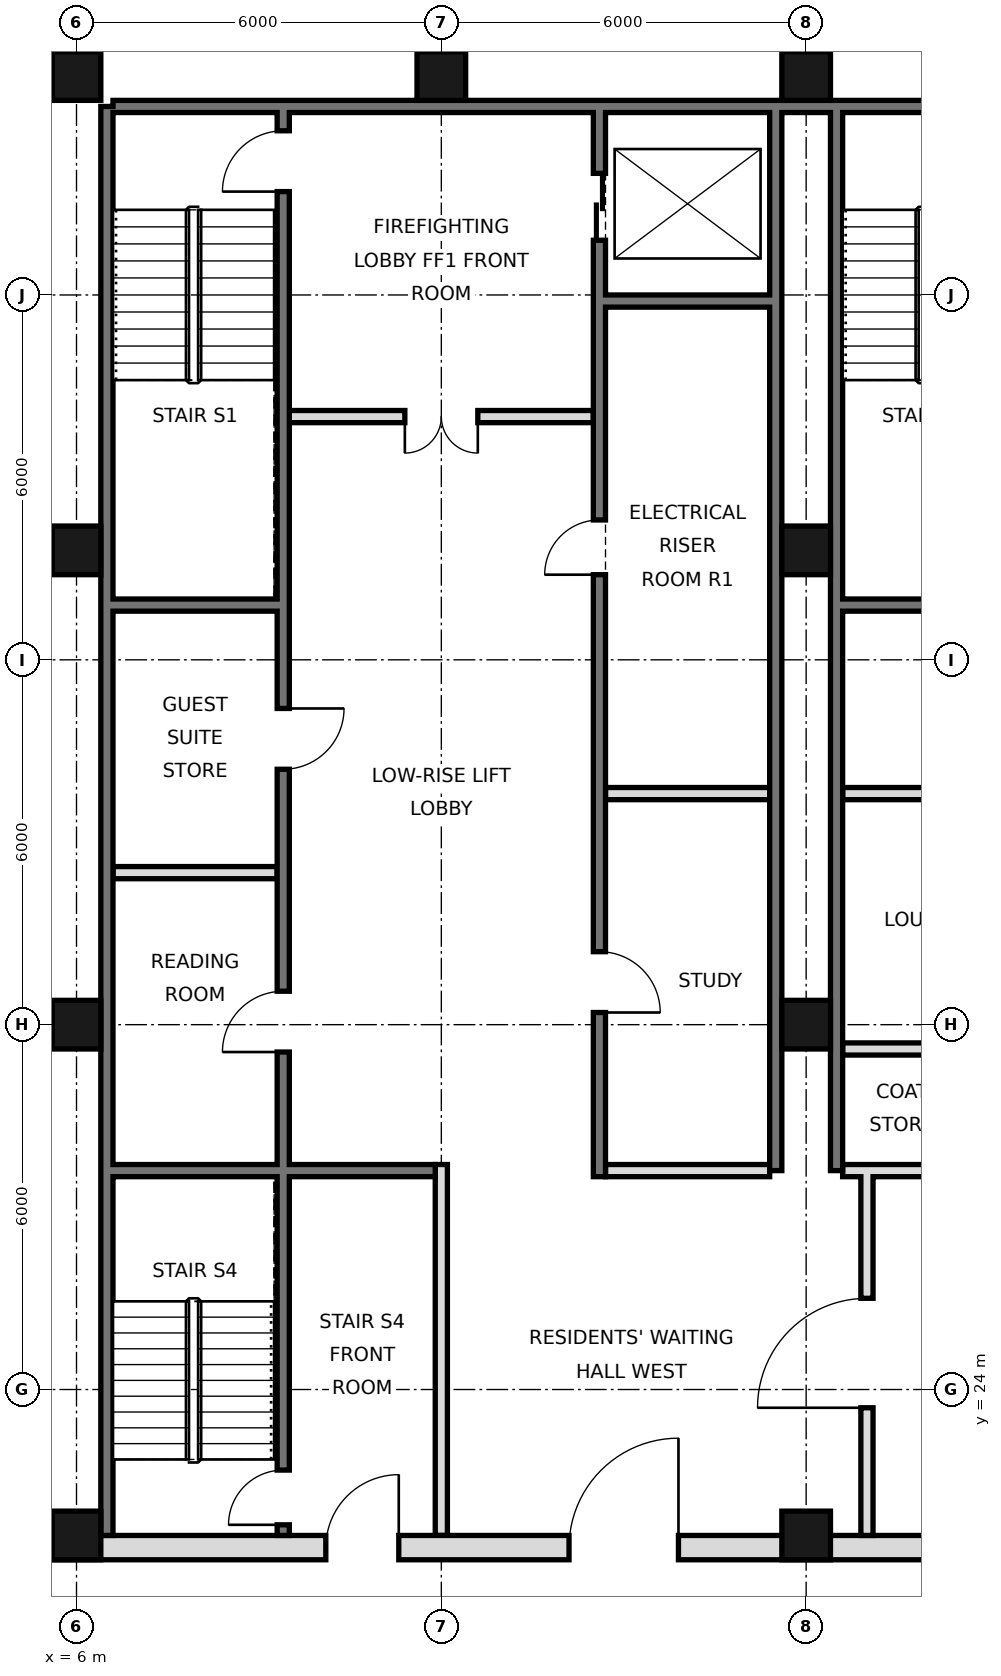
"""IFC4 building model, lengths in metres.
Left out: names, types, materials, properties, quantities, classifications, styles, units other than length and angle.
Written with IfcOpenShell. Run it as: python <this file> out.ifc"""

import sys

from ifc_helpers import new_model, si_unit, direction, frame, frame_2d, origin, origin_2d, place, context, subcontext, project, spatial, rectangle, hollow_rectangle, extrude, element, fill, save


model = new_model("IFC4")
c1 = context("Model", 3, precision=1e-05, world=origin(), true_north=direction((0.0, 1.0)))
c2 = subcontext(c1, "Body", "Model", "MODEL_VIEW")
j1 = project(units=[si_unit("LENGTHUNIT", "METRE"), si_unit("PLANEANGLEUNIT", "RADIAN")], contexts=[c1])
p1 = place(None, origin())
s1 = spatial("IfcSite", under=j1, at=p1, CompositionType="ELEMENT")
p2 = place(p1, origin())
s2 = spatial("IfcBuilding", under=s1, at=p2, CompositionType="ELEMENT")
p3 = place(p2, frame((0.0, 0.0, 323.2)))
s3 = spatial("IfcBuildingStorey", under=s2, at=p3, CompositionType="ELEMENT", Elevation=323.2)
for number, where, z_axis, x_axis in (
    (1, (6.0, 21.6, 0.0), (0.0, 0.0, 1.0), (1.0, 0.0, 0.0)),
    (2, (6.0, 30.0, 0.0), (0.0, 0.0, 1.0), (1.0, 0.0, 0.0)),
    (3, (6.0, 37.8, 0.0), (0.0, 0.0, 1.0), (1.0, 0.0, 0.0)),
    (4, (6.0, 45.6, 0.0), (0.0, 0.0, 1.0), (1.0, 0.0, 0.0)),
    (5, (12.0, 45.6, 0.0), (0.0, 0.0, 1.0), (1.0, 0.0, 0.0)),
    (6, (18.0, 21.6, 0.0), (0.0, 0.0, 1.0), (1.0, 0.0, 0.0)),
    (7, (18.0, 30.0, 0.0), (0.0, 0.0, 1.0), (1.0, 0.0, 0.0)),
    (8, (18.0, 37.8, 0.0), (0.0, 0.0, 1.0), (1.0, 0.0, 0.0)),
    (9, (18.0, 45.6, 0.0), (0.0, 0.0, 1.0), (1.0, 0.0, 0.0)),
):
    element("IfcColumn", number, at=place(p3, frame(where, z_axis=z_axis, x_axis=x_axis)), inside=s3, PredefinedType="COLUMN", context=c2, shape_type="SweptSolid", body=[
        extrude(hollow_rectangle(XDim=0.8, YDim=0.8, WallThickness=0.025, at=origin_2d()), origin(), (0.0, 0.0, 1.0), 3.6),
    ])
p4 = place(p3, frame((6.5, 21.6, 0.0), z_axis=(0.0, 0.0, 1.0), x_axis=(0.0, 1.0, 0.0)))
e10 = element("IfcWall", 10, at=p4, inside=s3, PredefinedType="SOLIDWALL", context=c2, shape_type="SweptSolid", body=[
    extrude(rectangle(XDim=23.5, YDim=0.2, at=frame_2d((11.75, 0.0))), origin(), (0.0, 0.0, 1.0), 3.42),
])
p5 = place(p3, frame((6.6, 45.1, 0.0), z_axis=(0.0, 0.0, 1.0), x_axis=(1.0, 0.0, 0.0)))
e11 = element("IfcWall", 11, at=p5, inside=s3, PredefinedType="SOLIDWALL", context=c2, shape_type="SweptSolid", body=[
    extrude(rectangle(XDim=34.8, YDim=0.2, at=frame_2d((17.4, 0.0))), origin(), (0.0, 0.0, 1.0), 3.42),
])
for number, where, z_axis, x_axis in (
    (12, (17.5, 27.6, 0.0), (0.0, 0.0, 1.0), (0.0, 1.0, 0.0)),
    (13, (18.5, 27.6, 0.0), (0.0, 0.0, 1.0), (0.0, 1.0, 0.0)),
):
    element("IfcWall", number, at=place(p3, frame(where, z_axis=z_axis, x_axis=x_axis)), inside=s3, PredefinedType="SOLIDWALL", context=c2, shape_type="SweptSolid", body=[
        extrude(rectangle(XDim=17.5, YDim=0.2, at=frame_2d((8.75, 0.0))), origin(), (0.0, 0.0, 1.0), 3.42),
    ])
p6 = place(p3, frame((5.6, 21.4, 0.0), z_axis=(0.0, 0.0, 1.0), x_axis=(1.0, 0.0, 0.0)))
e14 = element("IfcWall", 14, at=p6, inside=s3, PredefinedType="SOLIDWALL", context=c2, shape_type="SweptSolid", body=[
    extrude(rectangle(XDim=36.8, YDim=0.4, at=frame_2d((18.4, 0.0))), origin(), (0.0, 0.0, 1.0), 3.42),
])
p7 = place(p6, frame((8.5, 0.0, 0.0)))
e15 = element("IfcOpeningElement", 15, at=p7, cuts=e14, PredefinedType="OPENING", context=c2, shape_type="SweptSolid", body=[
    extrude(rectangle(XDim=1.8, YDim=2.1, at=frame_2d((0.9, 1.05))), frame((0.0, 0.21, 0.0), z_axis=(0.0, -1.0, 0.0), x_axis=(1.0, 0.0, 0.0)), (0.0, 0.0, 1.0), 0.42),
])
p8 = place(p6, frame((17.5, 0.0, 0.0)))
e16 = element("IfcOpeningElement", 16, at=p8, cuts=e14, PredefinedType="OPENING", context=c2, shape_type="SweptSolid", body=[
    extrude(rectangle(XDim=1.8, YDim=2.1, at=frame_2d((0.9, 1.05))), frame((0.0, 0.21, 0.0), z_axis=(0.0, -1.0, 0.0), x_axis=(1.0, 0.0, 0.0)), (0.0, 0.0, 1.0), 0.42),
])
p9 = place(p6, frame((26.5, 0.0, 0.0)))
e17 = element("IfcOpeningElement", 17, at=p9, cuts=e14, PredefinedType="OPENING", context=c2, shape_type="SweptSolid", body=[
    extrude(rectangle(XDim=1.8, YDim=2.1, at=frame_2d((0.9, 1.05))), frame((0.0, 0.21, 0.0), z_axis=(0.0, -1.0, 0.0), x_axis=(1.0, 0.0, 0.0)), (0.0, 0.0, 1.0), 0.42),
])
p10 = place(p6, frame((4.5, 0.0, 0.0)))
e18 = element("IfcOpeningElement", 18, at=p10, cuts=e14, PredefinedType="OPENING", context=c2, shape_type="SweptSolid", body=[
    extrude(rectangle(XDim=1.2, YDim=2.1, at=frame_2d((0.6, 1.05))), frame((0.0, 0.21, 0.0), z_axis=(0.0, -1.0, 0.0), x_axis=(1.0, 0.0, 0.0)), (0.0, 0.0, 1.0), 0.42),
])
p11 = place(p6, frame((31.1, 0.0, 0.0)))
e19 = element("IfcOpeningElement", 19, at=p11, cuts=e14, PredefinedType="OPENING", context=c2, shape_type="SweptSolid", body=[
    extrude(rectangle(XDim=1.2, YDim=2.1, at=frame_2d((0.6, 1.05))), frame((0.0, 0.21, 0.0), z_axis=(0.0, -1.0, 0.0), x_axis=(1.0, 0.0, 0.0)), (0.0, 0.0, 1.0), 0.42),
])
p12 = place(p3, frame((19.0, 21.6, 0.0), z_axis=(0.0, 0.0, 1.0), x_axis=(0.0, 1.0, 0.0)))
e20 = element("IfcWall", 20, at=p12, inside=s3, PredefinedType="PARTITIONING", context=c2, shape_type="SweptSolid", body=[
    extrude(rectangle(XDim=6.0, YDim=0.2, at=frame_2d((3.0, 0.0))), origin(), (0.0, 0.0, 1.0), 3.42),
])
p13 = place(p12, frame((2.1, 0.0, 0.0)))
e21 = element("IfcOpeningElement", 21, at=p13, cuts=e20, PredefinedType="OPENING", context=c2, shape_type="SweptSolid", body=[
    extrude(rectangle(XDim=1.8, YDim=2.1, at=frame_2d((0.9, 1.05))), frame((0.0, 0.11, 0.0), z_axis=(0.0, -1.0, 0.0), x_axis=(1.0, 0.0, 0.0)), (0.0, 0.0, 1.0), 0.22),
])
p14 = place(p3, frame((12.0, 21.6, 0.0), z_axis=(0.0, 0.0, 1.0), x_axis=(0.0, 1.0, 0.0)))
e22 = element("IfcWall", 22, at=p14, inside=s3, PredefinedType="PARTITIONING", context=c2, shape_type="SweptSolid", body=[
    extrude(rectangle(XDim=6.1, YDim=0.2, at=frame_2d((3.05, 0.0))), origin(), (0.0, 0.0, 1.0), 3.42),
])
p15 = place(p3, frame((14.6, 27.5, 0.0), z_axis=(0.0, 0.0, 1.0), x_axis=(0.0, 1.0, 0.0)))
e23 = element("IfcWall", 23, at=p15, inside=s3, PredefinedType="SOLIDWALL", context=c2, shape_type="SweptSolid", body=[
    extrude(rectangle(XDim=17.5, YDim=0.2, at=frame_2d((8.75, 0.0))), origin(), (0.0, 0.0, 1.0), 3.42),
])
p16 = place(p15, frame((15.4, 0.0, 0.0)))
e24 = element("IfcOpeningElement", 24, at=p16, cuts=e23, PredefinedType="OPENING", context=c2, shape_type="SweptSolid", body=[
    extrude(rectangle(XDim=1.1, YDim=2.1, at=frame_2d((0.55, 1.05))), frame((0.0, 0.11, 0.0), z_axis=(0.0, -1.0, 0.0), x_axis=(1.0, 0.0, 0.0)), (0.0, 0.0, 1.0), 0.22),
])
p17 = place(p15, frame((2.7, 0.0, 0.0)))
e25 = element("IfcOpeningElement", 25, at=p17, cuts=e23, PredefinedType="OPENING", context=c2, shape_type="SweptSolid", body=[
    extrude(rectangle(XDim=1.0, YDim=2.1, at=frame_2d((0.5, 1.05))), frame((0.0, 0.11, 0.0), z_axis=(0.0, -1.0, 0.0), x_axis=(1.0, 0.0, 0.0)), (0.0, 0.0, 1.0), 0.22),
])
p18 = place(p15, frame((9.9, 0.0, 0.0)))
e26 = element("IfcOpeningElement", 26, at=p18, cuts=e23, PredefinedType="OPENING", context=c2, shape_type="SweptSolid", body=[
    extrude(rectangle(XDim=0.9, YDim=2.1, at=frame_2d((0.45, 1.05))), frame((0.0, 0.11, 0.0), z_axis=(0.0, -1.0, 0.0), x_axis=(1.0, 0.0, 0.0)), (0.0, 0.0, 1.0), 0.22),
])
p19 = place(p3, frame((9.4, 21.6, 0.0), z_axis=(0.0, 0.0, 1.0), x_axis=(0.0, 1.0, 0.0)))
e27 = element("IfcWall", 27, at=p19, inside=s3, PredefinedType="SOLIDWALL", context=c2, shape_type="SweptSolid", body=[
    extrude(rectangle(XDim=23.4, YDim=0.2, at=frame_2d((11.7, 0.0))), origin(), (0.0, 0.0, 1.0), 3.42),
])
p20 = place(p19, frame((7.95, 0.0, 0.0)))
e28 = element("IfcOpeningElement", 28, at=p20, cuts=e27, PredefinedType="OPENING", context=c2, shape_type="SweptSolid", body=[
    extrude(rectangle(XDim=1.0, YDim=2.1, at=frame_2d((0.5, 1.05))), frame((0.0, 0.11, 0.0), z_axis=(0.0, -1.0, 0.0), x_axis=(1.0, 0.0, 0.0)), (0.0, 0.0, 1.0), 0.22),
])
p21 = place(p19, frame((12.6, 0.0, 0.0)))
e29 = element("IfcOpeningElement", 29, at=p21, cuts=e27, PredefinedType="OPENING", context=c2, shape_type="SweptSolid", body=[
    extrude(rectangle(XDim=1.0, YDim=2.1, at=frame_2d((0.5, 1.05))), frame((0.0, 0.11, 0.0), z_axis=(0.0, -1.0, 0.0), x_axis=(1.0, 0.0, 0.0)), (0.0, 0.0, 1.0), 0.22),
])
p22 = place(p19, frame((22.1, 0.0, 0.0)))
e30 = element("IfcOpeningElement", 30, at=p22, cuts=e27, PredefinedType="OPENING", context=c2, shape_type="SweptSolid", body=[
    extrude(rectangle(XDim=1.0, YDim=2.1, at=frame_2d((0.5, 1.05))), frame((0.0, 0.11, 0.0), z_axis=(0.0, -1.0, 0.0), x_axis=(1.0, 0.0, 0.0)), (0.0, 0.0, 1.0), 0.22),
])
p23 = place(p19, frame((0.175, 0.0, 0.0)))
e31 = element("IfcOpeningElement", 31, at=p23, cuts=e27, PredefinedType="OPENING", context=c2, shape_type="SweptSolid", body=[
    extrude(rectangle(XDim=0.9, YDim=2.1, at=frame_2d((0.45, 1.05))), frame((0.0, 0.11, 0.0), z_axis=(0.0, -1.0, 0.0), x_axis=(1.0, 0.0, 0.0)), (0.0, 0.0, 1.0), 0.22),
])
for number, where, z_axis, x_axis in (
    (32, (14.7, 27.6, 0.0), (0.0, 0.0, 1.0), (1.0, 0.0, 0.0)),
    (33, (18.6, 27.6, 0.0), (0.0, 0.0, 1.0), (1.0, 0.0, 0.0)),
):
    element("IfcWall", number, at=place(p3, frame(where, z_axis=z_axis, x_axis=x_axis)), inside=s3, PredefinedType="PARTITIONING", context=c2, shape_type="SweptSolid", body=[
        extrude(rectangle(XDim=2.7, YDim=0.2, at=frame_2d((1.35, 0.0))), origin(), (0.0, 0.0, 1.0), 3.42),
    ])
p24 = place(p3, frame((6.6, 27.6, 0.0), z_axis=(0.0, 0.0, 1.0), x_axis=(1.0, 0.0, 0.0)))
e34 = element("IfcWall", 34, at=p24, inside=s3, PredefinedType="SOLIDWALL", context=c2, shape_type="SweptSolid", body=[
    extrude(rectangle(XDim=5.3, YDim=0.2, at=frame_2d((2.65, 0.0))), origin(), (0.0, 0.0, 1.0), 3.42),
])
for number, where, z_axis, x_axis in (
    (35, (18.6, 29.6, 0.0), (0.0, 0.0, 1.0), (1.0, 0.0, 0.0)),
    (36, (6.6, 32.5, 0.0), (0.0, 0.0, 1.0), (1.0, 0.0, 0.0)),
):
    element("IfcWall", number, at=place(p3, frame(where, z_axis=z_axis, x_axis=x_axis)), inside=s3, PredefinedType="PARTITIONING", context=c2, shape_type="SweptSolid", body=[
        extrude(rectangle(XDim=2.7, YDim=0.2, at=frame_2d((1.35, 0.0))), origin(), (0.0, 0.0, 1.0), 3.42),
    ])
for number, where, z_axis, x_axis in (
    (37, (14.7, 33.8, 0.0), (0.0, 0.0, 1.0), (1.0, 0.0, 0.0)),
    (38, (18.6, 33.8, 0.0), (0.0, 0.0, 1.0), (1.0, 0.0, 0.0)),
    (39, (18.6, 36.9, 0.0), (0.0, 0.0, 1.0), (1.0, 0.0, 0.0)),
    (40, (6.6, 36.9, 0.0), (0.0, 0.0, 1.0), (1.0, 0.0, 0.0)),
):
    element("IfcWall", number, at=place(p3, frame(where, z_axis=z_axis, x_axis=x_axis)), inside=s3, PredefinedType="SOLIDWALL", context=c2, shape_type="SweptSolid", body=[
        extrude(rectangle(XDim=2.7, YDim=0.2, at=frame_2d((1.35, 0.0))), origin(), (0.0, 0.0, 1.0), 3.42),
    ])
p25 = place(p3, frame((9.5, 40.0, 0.0), z_axis=(0.0, 0.0, 1.0), x_axis=(1.0, 0.0, 0.0)))
e41 = element("IfcWall", 41, at=p25, inside=s3, PredefinedType="PARTITIONING", context=c2, shape_type="SweptSolid", body=[
    extrude(rectangle(XDim=5.0, YDim=0.2, at=frame_2d((2.5, 0.0))), origin(), (0.0, 0.0, 1.0), 3.42),
])
p26 = place(p25, frame((1.9, 0.0, 0.0)))
e42 = element("IfcOpeningElement", 42, at=p26, cuts=e41, PredefinedType="OPENING", context=c2, shape_type="SweptSolid", body=[
    extrude(rectangle(XDim=1.2, YDim=2.1, at=frame_2d((0.6, 1.05))), frame((0.0, 0.11, 0.0), z_axis=(0.0, -1.0, 0.0), x_axis=(1.0, 0.0, 0.0)), (0.0, 0.0, 1.0), 0.22),
])
p27 = place(p3, frame((14.7, 41.9, 0.0), z_axis=(0.0, 0.0, 1.0), x_axis=(1.0, 0.0, 0.0)))
e43 = element("IfcWall", 43, at=p27, inside=s3, PredefinedType="SOLIDWALL", context=c2, shape_type="SweptSolid", body=[
    extrude(rectangle(XDim=2.7, YDim=0.2, at=frame_2d((1.35, 0.0))), origin(), (0.0, 0.0, 1.0), 3.42),
])
p28 = place(p7, frame((1.8, 0.0, 0.0), z_axis=(0.0, 0.0, 1.0), x_axis=(-1.0, 0.0, 0.0)))
e44 = element("IfcDoor", 44, at=p28, inside=s3, OperationType="SINGLE_SWING_LEFT", PredefinedType="DOOR", context=c2, shape_type="SweptSolid", body=[
    extrude(rectangle(XDim=1.8, YDim=2.1, at=frame_2d((0.9, 1.05))), frame((0.0, 0.025, 0.0), z_axis=(0.0, -1.0, 0.0), x_axis=(1.0, 0.0, 0.0)), (0.0, 0.0, 1.0), 0.05),
])
fill(e15, e44)
p29 = place(p13, origin())
e45 = element("IfcDoor", 45, at=p29, inside=s3, OperationType="SINGLE_SWING_LEFT", PredefinedType="DOOR", context=c2, shape_type="SweptSolid", body=[
    extrude(rectangle(XDim=1.8, YDim=2.1, at=frame_2d((0.9, 1.05))), frame((0.0, 0.025, 0.0), z_axis=(0.0, -1.0, 0.0), x_axis=(1.0, 0.0, 0.0)), (0.0, 0.0, 1.0), 0.05),
])
fill(e21, e45)
p30 = place(p10, frame((1.2, 0.0, 0.0), z_axis=(0.0, 0.0, 1.0), x_axis=(-1.0, 0.0, 0.0)))
e46 = element("IfcDoor", 46, at=p30, inside=s3, OperationType="SINGLE_SWING_LEFT", PredefinedType="DOOR", context=c2, shape_type="SweptSolid", body=[
    extrude(rectangle(XDim=1.2, YDim=2.1, at=frame_2d((0.6, 1.05))), frame((0.0, 0.025, 0.0), z_axis=(0.0, -1.0, 0.0), x_axis=(1.0, 0.0, 0.0)), (0.0, 0.0, 1.0), 0.05),
])
fill(e18, e46)
p31 = place(p26, frame((1.2, 0.0, 0.0), z_axis=(0.0, 0.0, 1.0), x_axis=(-1.0, 0.0, 0.0)))
e47 = element("IfcDoor", 47, at=p31, inside=s3, OperationType="DOUBLE_DOOR_SINGLE_SWING", PredefinedType="DOOR", context=c2, shape_type="SweptSolid", body=[
    extrude(rectangle(XDim=1.2, YDim=2.1, at=frame_2d((0.6, 1.05))), frame((0.0, 0.025, 0.0), z_axis=(0.0, -1.0, 0.0), x_axis=(1.0, 0.0, 0.0)), (0.0, 0.0, 1.0), 0.05),
])
fill(e42, e47)
p32 = place(p16, origin())
e48 = element("IfcDoor", 48, at=p32, inside=s3, OperationType="DOUBLE_DOOR_SLIDING", PredefinedType="DOOR", context=c2, shape_type="SweptSolid", body=[
    extrude(rectangle(XDim=1.1, YDim=2.1, at=frame_2d((0.55, 1.05))), frame((0.0, 0.025, 0.0), z_axis=(0.0, -1.0, 0.0), x_axis=(1.0, 0.0, 0.0)), (0.0, 0.0, 1.0), 0.05),
])
fill(e24, e48)
p33 = place(p17, frame((1.0, 0.0, 0.0), z_axis=(0.0, 0.0, 1.0), x_axis=(-1.0, 0.0, 0.0)))
e49 = element("IfcDoor", 49, at=p33, inside=s3, OperationType="SINGLE_SWING_RIGHT", PredefinedType="DOOR", context=c2, shape_type="SweptSolid", body=[
    extrude(rectangle(XDim=1.0, YDim=2.1, at=frame_2d((0.5, 1.05))), frame((0.0, 0.025, 0.0), z_axis=(0.0, -1.0, 0.0), x_axis=(1.0, 0.0, 0.0)), (0.0, 0.0, 1.0), 0.05),
])
fill(e25, e49)
p34 = place(p20, origin())
e50 = element("IfcDoor", 50, at=p34, inside=s3, OperationType="SINGLE_SWING_LEFT", PredefinedType="DOOR", context=c2, shape_type="SweptSolid", body=[
    extrude(rectangle(XDim=1.0, YDim=2.1, at=frame_2d((0.5, 1.05))), frame((0.0, 0.025, 0.0), z_axis=(0.0, -1.0, 0.0), x_axis=(1.0, 0.0, 0.0)), (0.0, 0.0, 1.0), 0.05),
])
fill(e28, e50)
p35 = place(p21, origin())
e51 = element("IfcDoor", 51, at=p35, inside=s3, OperationType="SINGLE_SWING_RIGHT", PredefinedType="DOOR", context=c2, shape_type="SweptSolid", body=[
    extrude(rectangle(XDim=1.0, YDim=2.1, at=frame_2d((0.5, 1.05))), frame((0.0, 0.025, 0.0), z_axis=(0.0, -1.0, 0.0), x_axis=(1.0, 0.0, 0.0)), (0.0, 0.0, 1.0), 0.05),
])
fill(e29, e51)
p36 = place(p22, origin())
e52 = element("IfcDoor", 52, at=p36, inside=s3, OperationType="SINGLE_SWING_LEFT", PredefinedType="DOOR", context=c2, shape_type="SweptSolid", body=[
    extrude(rectangle(XDim=1.0, YDim=2.1, at=frame_2d((0.5, 1.05))), frame((0.0, 0.025, 0.0), z_axis=(0.0, -1.0, 0.0), x_axis=(1.0, 0.0, 0.0)), (0.0, 0.0, 1.0), 0.05),
])
fill(e30, e52)
p37 = place(p23, origin())
e53 = element("IfcDoor", 53, at=p37, inside=s3, OperationType="SINGLE_SWING_LEFT", PredefinedType="DOOR", context=c2, shape_type="SweptSolid", body=[
    extrude(rectangle(XDim=0.9, YDim=2.1, at=frame_2d((0.45, 1.05))), frame((0.0, 0.025, 0.0), z_axis=(0.0, -1.0, 0.0), x_axis=(1.0, 0.0, 0.0)), (0.0, 0.0, 1.0), 0.05),
])
fill(e31, e53)
p38 = place(p18, origin())
e54 = element("IfcDoor", 54, at=p38, inside=s3, OperationType="SINGLE_SWING_LEFT", PredefinedType="DOOR", context=c2, shape_type="SweptSolid", body=[
    extrude(rectangle(XDim=0.9, YDim=2.1, at=frame_2d((0.45, 1.05))), frame((0.0, 0.025, 0.0), z_axis=(0.0, -1.0, 0.0), x_axis=(1.0, 0.0, 0.0)), (0.0, 0.0, 1.0), 0.05),
])
fill(e26, e54)
save(model, sys.argv[1])
